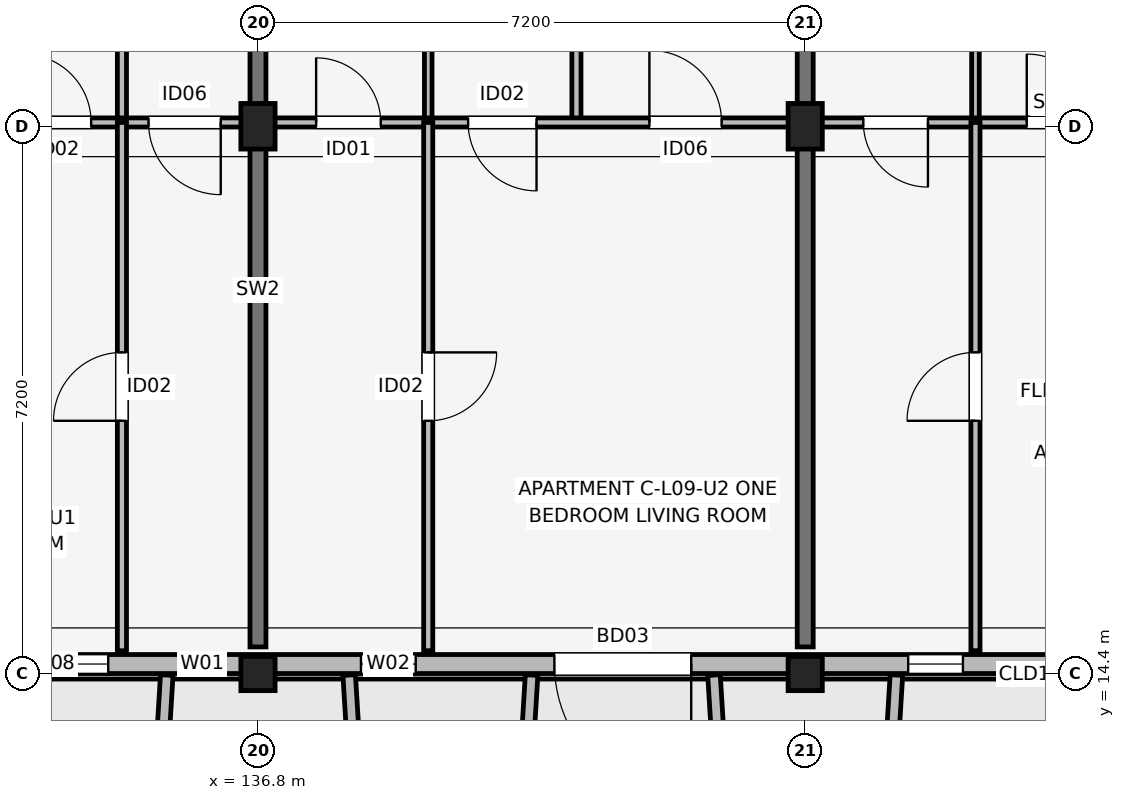
"""IFC4 building model, lengths in metres.
Left out: names, types, materials, properties, quantities, classifications, styles, units other than length and angle.
Written with IfcOpenShell. Run it as: python <this file> out.ifc"""

import sys

from ifc_helpers import new_model, si_unit, direction, frame, frame_2d, origin, origin_2d, place, context, subcontext, project, spatial, rectangle, extrude, element, fill, save


model = new_model("IFC4")
c1 = context("Model", 3, precision=1e-05, world=origin(), true_north=direction((0.0, 1.0)))
c2 = subcontext(c1, "Body", "Model", "MODEL_VIEW")
j1 = project(units=[si_unit("LENGTHUNIT", "METRE"), si_unit("PLANEANGLEUNIT", "RADIAN")], contexts=[c1])
p1 = place(None, origin())
s1 = spatial("IfcSite", under=j1, at=p1, CompositionType="ELEMENT")
p2 = place(p1, origin())
s2 = spatial("IfcBuilding", under=s1, at=p2, CompositionType="ELEMENT")
p3 = place(p2, frame((0.0, 0.0, 30.75)))
s3 = spatial("IfcBuildingStorey", under=s2, at=p3, CompositionType="ELEMENT", Elevation=30.75)
p4 = place(p3, frame((136.8, 14.4, 0.0), z_axis=(0.0, 0.0, 1.0), x_axis=(1.0, 0.0, 0.0)))
e1 = element("IfcColumn", 1, at=p4, inside=s3, PredefinedType="COLUMN", context=c2, shape_type="SweptSolid", body=[
    extrude(rectangle(XDim=0.45, YDim=0.45, at=origin_2d()), origin(), (0.0, 0.0, 1.0), 3.15),
])
p5 = place(p3, frame((136.8, 21.6, 0.0), z_axis=(0.0, 0.0, 1.0), x_axis=(1.0, 0.0, 0.0)))
e2 = element("IfcColumn", 2, at=p5, inside=s3, PredefinedType="COLUMN", context=c2, shape_type="SweptSolid", body=[
    extrude(rectangle(XDim=0.45, YDim=0.6, at=origin_2d()), origin(), (0.0, 0.0, 1.0), 3.15),
])
p6 = place(p3, frame((144.0, 14.4, 0.0), z_axis=(0.0, 0.0, 1.0), x_axis=(1.0, 0.0, 0.0)))
e3 = element("IfcColumn", 3, at=p6, inside=s3, PredefinedType="COLUMN", context=c2, shape_type="SweptSolid", body=[
    extrude(rectangle(XDim=0.45, YDim=0.45, at=origin_2d()), origin(), (0.0, 0.0, 1.0), 3.15),
])
p7 = place(p3, frame((144.0, 21.6, 0.0), z_axis=(0.0, 0.0, 1.0), x_axis=(1.0, 0.0, 0.0)))
e4 = element("IfcColumn", 4, at=p7, inside=s3, PredefinedType="COLUMN", context=c2, shape_type="SweptSolid", body=[
    extrude(rectangle(XDim=0.45, YDim=0.6, at=origin_2d()), origin(), (0.0, 0.0, 1.0), 3.15),
])
for number, where, z_axis, x_axis in (
    (5, (136.8, 14.75, 0.0), (0.0, 0.0, 1.0), (0.0, 1.0, 0.0)),
    (6, (144.0, 14.75, 0.0), (0.0, 0.0, 1.0), (0.0, 1.0, 0.0)),
):
    element("IfcWall", number, at=place(p3, frame(where, z_axis=z_axis, x_axis=x_axis)), inside=s3, PredefinedType="SHEAR", context=c2, shape_type="SweptSolid", body=[
        extrude(rectangle(XDim=9.4, YDim=0.21, at=frame_2d((4.7, 0.0))), origin(), (0.0, 0.0, 1.0), 3.15),
    ])
p8 = place(p3, frame((132.6, 14.525, 0.0), z_axis=(0.0, 0.0, 1.0), x_axis=(1.0, 0.0, 0.0)))
e7 = element("IfcWall", 7, at=p8, inside=s3, PredefinedType="SOLIDWALL", context=c2, shape_type="SweptSolid", body=[
    extrude(rectangle(XDim=30.0, YDim=0.25, at=frame_2d((15.0, 0.0))), origin(), (0.0, 0.0, 1.0), 2.48),
])
p9 = place(p8, frame((9.9, 0.0, 0.0), z_axis=(0.0, 0.0, 1.0), x_axis=(-1.0, 0.0, 0.0)))
e8 = element("IfcOpeningElement", 8, at=p9, cuts=e7, PredefinedType="OPENING", context=c2, shape_type="SweptSolid", body=[
    extrude(rectangle(XDim=1.8, YDim=2.15, at=frame_2d((0.9, 1.075))), frame((0.0, 0.135, 0.0), z_axis=(0.0, -1.0, 0.0), x_axis=(1.0, 0.0, 0.0)), (0.0, 0.0, 1.0), 0.27),
])
p10 = place(p8, frame((24.225, 0.0, 0.0), z_axis=(0.0, 0.0, 1.0), x_axis=(-1.0, 0.0, 0.0)))
e9 = element("IfcOpeningElement", 9, at=p10, cuts=e7, PredefinedType="OPENING", context=c2, shape_type="SweptSolid", body=[
    extrude(rectangle(XDim=1.65, YDim=2.15, at=frame_2d((0.825, 1.075))), frame((0.0, 0.135, 0.0), z_axis=(0.0, -1.0, 0.0), x_axis=(1.0, 0.0, 0.0)), (0.0, 0.0, 1.0), 0.27),
])
p11 = place(p8, frame((0.77, 0.0, 0.7)))
e10 = element("IfcOpeningElement", 10, at=p11, cuts=e7, PredefinedType="OPENING", context=c2, shape_type="SweptSolid", body=[
    extrude(rectangle(XDim=1.46, YDim=1.55, at=frame_2d((0.73, 0.775))), frame((0.0, 0.135, 0.0), z_axis=(0.0, -1.0, 0.0), x_axis=(1.0, 0.0, 0.0)), (0.0, 0.0, 1.0), 0.27),
])
p12 = place(p8, frame((3.167, 0.0, 0.75)))
e11 = element("IfcOpeningElement", 11, at=p12, cuts=e7, PredefinedType="OPENING", context=c2, shape_type="SweptSolid", body=[
    extrude(rectangle(XDim=0.6, YDim=1.25, at=frame_2d((0.3, 0.625))), frame((0.0, 0.135, 0.0), z_axis=(0.0, -1.0, 0.0), x_axis=(1.0, 0.0, 0.0)), (0.0, 0.0, 1.0), 0.27),
])
p13 = place(p8, frame((5.555, 0.0, 0.75)))
e12 = element("IfcOpeningElement", 12, at=p13, cuts=e7, PredefinedType="OPENING", context=c2, shape_type="SweptSolid", body=[
    extrude(rectangle(XDim=0.72, YDim=1.35, at=frame_2d((0.36, 0.675))), frame((0.0, 0.135, 0.0), z_axis=(0.0, -1.0, 0.0), x_axis=(1.0, 0.0, 0.0)), (0.0, 0.0, 1.0), 0.27),
])
p14 = place(p8, frame((12.755, 0.0, 0.75)))
e13 = element("IfcOpeningElement", 13, at=p14, cuts=e7, PredefinedType="OPENING", context=c2, shape_type="SweptSolid", body=[
    extrude(rectangle(XDim=0.72, YDim=1.35, at=frame_2d((0.36, 0.675))), frame((0.0, 0.135, 0.0), z_axis=(0.0, -1.0, 0.0), x_axis=(1.0, 0.0, 0.0)), (0.0, 0.0, 1.0), 0.27),
])
p15 = place(p8, frame((15.34, 0.0, 0.7)))
e14 = element("IfcOpeningElement", 14, at=p15, cuts=e7, PredefinedType="OPENING", context=c2, shape_type="SweptSolid", body=[
    extrude(rectangle(XDim=1.72, YDim=1.6, at=frame_2d((0.86, 0.8))), frame((0.0, 0.135, 0.0), z_axis=(0.0, -1.0, 0.0), x_axis=(1.0, 0.0, 0.0)), (0.0, 0.0, 1.0), 0.27),
])
p16 = place(p8, frame((26.232, 0.0, 0.75)))
e15 = element("IfcOpeningElement", 15, at=p16, cuts=e7, PredefinedType="OPENING", context=c2, shape_type="SweptSolid", body=[
    extrude(rectangle(XDim=0.6, YDim=1.25, at=frame_2d((0.3, 0.625))), frame((0.0, 0.135, 0.0), z_axis=(0.0, -1.0, 0.0), x_axis=(1.0, 0.0, 0.0)), (0.0, 0.0, 1.0), 0.27),
])
p17 = place(p8, frame((28.27, 0.0, 0.75)))
e16 = element("IfcOpeningElement", 16, at=p17, cuts=e7, PredefinedType="OPENING", context=c2, shape_type="SweptSolid", body=[
    extrude(rectangle(XDim=0.72, YDim=1.35, at=frame_2d((0.36, 0.675))), frame((0.0, 0.135, 0.0), z_axis=(0.0, -1.0, 0.0), x_axis=(1.0, 0.0, 0.0)), (0.0, 0.0, 1.0), 0.27),
])
p18 = place(p3, frame((135.6, 14.38, 0.0), z_axis=(0.0, 0.0, 1.0), x_axis=(-0.061170732449, -0.998127317276, 0.0)))
e17 = element("IfcWall", 17, at=p18, inside=s3, PredefinedType="ELEMENTEDWALL", context=c2, shape_type="SweptSolid", body=[
    extrude(rectangle(XDim=1.964, YDim=0.165, at=frame_2d((0.982, 0.0))), origin(), (0.0, 0.0, 1.0), 2.95),
])
for number, where, z_axis, x_axis in (
    (18, (138.0, 14.38, 0.0), (0.0, 0.0, 1.0), (0.061, -0.998, 0.0)),
    (19, (140.4, 14.38, 0.0), (0.0, 0.0, 1.0), (-0.061, -0.998, 0.0)),
    (20, (142.8, 14.38, 0.0), (0.0, 0.0, 1.0), (0.061, -0.998, 0.0)),
):
    element("IfcWall", number, at=place(p3, frame(where, z_axis=z_axis, x_axis=x_axis)), inside=s3, PredefinedType="ELEMENTEDWALL", context=c2, shape_type="SweptSolid", body=[
        extrude(rectangle(XDim=1.964, YDim=0.165, at=frame_2d((0.982, 0.0))), origin(), (0.0, 0.0, 1.0), 2.48),
    ])
p19 = place(p3, frame((145.2, 14.38, 0.0), z_axis=(0.0, 0.0, 1.0), x_axis=(-0.061046865508, -0.998134900808, 0.0)))
e21 = element("IfcWall", 21, at=p19, inside=s3, PredefinedType="ELEMENTEDWALL", context=c2, shape_type="SweptSolid", body=[
    extrude(rectangle(XDim=1.964, YDim=0.165, at=frame_2d((0.982, 0.0))), origin(), (0.0, 0.0, 1.0), 2.55),
])
p20 = place(p3, frame((135.01, 21.65, 0.0), z_axis=(0.0, 0.0, 1.0), x_axis=(0.0, 1.0, 0.0)))
e22 = element("IfcWall", 22, at=p20, inside=s3, PredefinedType="PARTITIONING", context=c2, shape_type="SweptSolid", body=[
    extrude(rectangle(XDim=2.65, YDim=0.12, at=frame_2d((1.325, 0.0))), origin(), (0.0, 0.0, 1.0), 2.38),
])
p21 = place(p3, frame((129.74, 21.65, 0.0), z_axis=(0.0, 0.0, 1.0), x_axis=(1.0, 0.0, 0.0)))
e23 = element("IfcWall", 23, at=p21, inside=s3, PredefinedType="PARTITIONING", context=c2, shape_type="SweptSolid", body=[
    extrude(rectangle(XDim=6.92, YDim=0.12, at=frame_2d((3.46, 0.0))), origin(), (0.0, 0.0, 1.0), 2.38),
])
p22 = place(p21, frame((3.06, 0.0, 0.0), z_axis=(0.0, 0.0, 1.0), x_axis=(-1.0, 0.0, 0.0)))
e24 = element("IfcOpeningElement", 24, at=p22, cuts=e23, PredefinedType="OPENING", context=c2, shape_type="SweptSolid", body=[
    extrude(rectangle(XDim=0.85, YDim=2.08, at=frame_2d((0.425, 1.04))), frame((0.0, 0.07, 0.0), z_axis=(0.0, -1.0, 0.0), x_axis=(1.0, 0.0, 0.0)), (0.0, 0.0, 1.0), 0.14),
])
p23 = place(p21, frame((3.965, 0.0, 0.0)))
e25 = element("IfcOpeningElement", 25, at=p23, cuts=e23, PredefinedType="OPENING", context=c2, shape_type="SweptSolid", body=[
    extrude(rectangle(XDim=0.9, YDim=2.08, at=frame_2d((0.45, 1.04))), frame((0.0, 0.07, 0.0), z_axis=(0.0, -1.0, 0.0), x_axis=(1.0, 0.0, 0.0)), (0.0, 0.0, 1.0), 0.14),
])
p24 = place(p21, frame((6.57, 0.0, 0.0), z_axis=(0.0, 0.0, 1.0), x_axis=(-1.0, 0.0, 0.0)))
e26 = element("IfcOpeningElement", 26, at=p24, cuts=e23, PredefinedType="OPENING", context=c2, shape_type="SweptSolid", body=[
    extrude(rectangle(XDim=0.95, YDim=2.08, at=frame_2d((0.475, 1.04))), frame((0.0, 0.07, 0.0), z_axis=(0.0, -1.0, 0.0), x_axis=(1.0, 0.0, 0.0)), (0.0, 0.0, 1.0), 0.14),
])
p25 = place(p3, frame((135.01, 14.7, 0.0), z_axis=(0.0, 0.0, 1.0), x_axis=(0.0, 1.0, 0.0)))
e27 = element("IfcWall", 27, at=p25, inside=s3, PredefinedType="PARTITIONING", context=c2, shape_type="SweptSolid", body=[
    extrude(rectangle(XDim=6.95, YDim=0.12, at=frame_2d((3.475, 0.0))), origin(), (0.0, 0.0, 1.0), 2.38),
])
p26 = place(p25, frame((3.025, 0.0, 0.0)))
e28 = element("IfcOpeningElement", 28, at=p26, cuts=e27, PredefinedType="OPENING", context=c2, shape_type="SweptSolid", body=[
    extrude(rectangle(XDim=0.9, YDim=2.08, at=frame_2d((0.45, 1.04))), frame((0.0, 0.07, 0.0), z_axis=(0.0, -1.0, 0.0), x_axis=(1.0, 0.0, 0.0)), (0.0, 0.0, 1.0), 0.14),
])
p27 = place(p3, frame((139.04, 21.65, 0.0), z_axis=(0.0, 0.0, 1.0), x_axis=(0.0, 1.0, 0.0)))
e29 = element("IfcWall", 29, at=p27, inside=s3, PredefinedType="PARTITIONING", context=c2, shape_type="SweptSolid", body=[
    extrude(rectangle(XDim=2.65, YDim=0.1, at=frame_2d((1.325, 0.0))), origin(), (0.0, 0.0, 1.0), 2.38),
])
p28 = place(p3, frame((140.99, 21.65, 0.0), z_axis=(0.0, 0.0, 1.0), x_axis=(0.0, 1.0, 0.0)))
e30 = element("IfcWall", 30, at=p28, inside=s3, PredefinedType="PARTITIONING", context=c2, shape_type="SweptSolid", body=[
    extrude(rectangle(XDim=2.65, YDim=0.12, at=frame_2d((1.325, 0.0))), origin(), (0.0, 0.0, 1.0), 2.38),
])
p29 = place(p3, frame((136.94, 21.65, 0.0), z_axis=(0.0, 0.0, 1.0), x_axis=(1.0, 0.0, 0.0)))
e31 = element("IfcWall", 31, at=p29, inside=s3, PredefinedType="PARTITIONING", context=c2, shape_type="SweptSolid", body=[
    extrude(rectangle(XDim=6.92, YDim=0.12, at=frame_2d((3.46, 0.0))), origin(), (0.0, 0.0, 1.0), 2.38),
])
p30 = place(p29, frame((0.625, 0.0, 0.0)))
e32 = element("IfcOpeningElement", 32, at=p30, cuts=e31, PredefinedType="OPENING", context=c2, shape_type="SweptSolid", body=[
    extrude(rectangle(XDim=0.85, YDim=2.08, at=frame_2d((0.425, 1.04))), frame((0.0, 0.07, 0.0), z_axis=(0.0, -1.0, 0.0), x_axis=(1.0, 0.0, 0.0)), (0.0, 0.0, 1.0), 0.14),
])
p31 = place(p29, frame((3.525, 0.0, 0.0), z_axis=(0.0, 0.0, 1.0), x_axis=(-1.0, 0.0, 0.0)))
e33 = element("IfcOpeningElement", 33, at=p31, cuts=e31, PredefinedType="OPENING", context=c2, shape_type="SweptSolid", body=[
    extrude(rectangle(XDim=0.9, YDim=2.08, at=frame_2d((0.45, 1.04))), frame((0.0, 0.07, 0.0), z_axis=(0.0, -1.0, 0.0), x_axis=(1.0, 0.0, 0.0)), (0.0, 0.0, 1.0), 0.14),
])
p32 = place(p29, frame((5.01, 0.0, 0.0)))
e34 = element("IfcOpeningElement", 34, at=p32, cuts=e31, PredefinedType="OPENING", context=c2, shape_type="SweptSolid", body=[
    extrude(rectangle(XDim=0.95, YDim=2.08, at=frame_2d((0.475, 1.04))), frame((0.0, 0.07, 0.0), z_axis=(0.0, -1.0, 0.0), x_axis=(1.0, 0.0, 0.0)), (0.0, 0.0, 1.0), 0.14),
])
p33 = place(p3, frame((139.04, 14.7, 0.0), z_axis=(0.0, 0.0, 1.0), x_axis=(0.0, 1.0, 0.0)))
e35 = element("IfcWall", 35, at=p33, inside=s3, PredefinedType="PARTITIONING", context=c2, shape_type="SweptSolid", body=[
    extrude(rectangle(XDim=6.95, YDim=0.12, at=frame_2d((3.475, 0.0))), origin(), (0.0, 0.0, 1.0), 2.38),
])
p34 = place(p33, frame((3.925, 0.0, 0.0), z_axis=(0.0, 0.0, 1.0), x_axis=(-1.0, 0.0, 0.0)))
e36 = element("IfcOpeningElement", 36, at=p34, cuts=e35, PredefinedType="OPENING", context=c2, shape_type="SweptSolid", body=[
    extrude(rectangle(XDim=0.9, YDim=2.08, at=frame_2d((0.45, 1.04))), frame((0.0, 0.07, 0.0), z_axis=(0.0, -1.0, 0.0), x_axis=(1.0, 0.0, 0.0)), (0.0, 0.0, 1.0), 0.14),
])
p35 = place(p3, frame((146.24, 21.65, 0.0), z_axis=(0.0, 0.0, 1.0), x_axis=(0.0, 1.0, 0.0)))
e37 = element("IfcWall", 37, at=p35, inside=s3, PredefinedType="PARTITIONING", context=c2, shape_type="SweptSolid", body=[
    extrude(rectangle(XDim=2.65, YDim=0.1, at=frame_2d((1.325, 0.0))), origin(), (0.0, 0.0, 1.0), 2.38),
])
p36 = place(p3, frame((144.14, 21.65, 0.0), z_axis=(0.0, 0.0, 1.0), x_axis=(1.0, 0.0, 0.0)))
e38 = element("IfcWall", 38, at=p36, inside=s3, PredefinedType="PARTITIONING", context=c2, shape_type="SweptSolid", body=[
    extrude(rectangle(XDim=6.92, YDim=0.12, at=frame_2d((3.46, 0.0))), origin(), (0.0, 0.0, 1.0), 2.38),
])
p37 = place(p36, frame((1.475, 0.0, 0.0), z_axis=(0.0, 0.0, 1.0), x_axis=(-1.0, 0.0, 0.0)))
e39 = element("IfcOpeningElement", 39, at=p37, cuts=e38, PredefinedType="OPENING", context=c2, shape_type="SweptSolid", body=[
    extrude(rectangle(XDim=0.85, YDim=2.08, at=frame_2d((0.425, 1.04))), frame((0.0, 0.07, 0.0), z_axis=(0.0, -1.0, 0.0), x_axis=(1.0, 0.0, 0.0)), (0.0, 0.0, 1.0), 0.14),
])
p38 = place(p36, frame((2.775, 0.0, 0.0)))
e40 = element("IfcOpeningElement", 40, at=p38, cuts=e38, PredefinedType="OPENING", context=c2, shape_type="SweptSolid", body=[
    extrude(rectangle(XDim=0.9, YDim=2.08, at=frame_2d((0.45, 1.04))), frame((0.0, 0.07, 0.0), z_axis=(0.0, -1.0, 0.0), x_axis=(1.0, 0.0, 0.0)), (0.0, 0.0, 1.0), 0.14),
])
p39 = place(p36, frame((6.11, 0.0, 0.0), z_axis=(0.0, 0.0, 1.0), x_axis=(-1.0, 0.0, 0.0)))
e41 = element("IfcOpeningElement", 41, at=p39, cuts=e38, PredefinedType="OPENING", context=c2, shape_type="SweptSolid", body=[
    extrude(rectangle(XDim=0.95, YDim=2.08, at=frame_2d((0.475, 1.04))), frame((0.0, 0.07, 0.0), z_axis=(0.0, -1.0, 0.0), x_axis=(1.0, 0.0, 0.0)), (0.0, 0.0, 1.0), 0.14),
])
p40 = place(p3, frame((146.24, 14.7, 0.0), z_axis=(0.0, 0.0, 1.0), x_axis=(0.0, 1.0, 0.0)))
e42 = element("IfcWall", 42, at=p40, inside=s3, PredefinedType="PARTITIONING", context=c2, shape_type="SweptSolid", body=[
    extrude(rectangle(XDim=6.95, YDim=0.12, at=frame_2d((3.475, 0.0))), origin(), (0.0, 0.0, 1.0), 2.38),
])
p41 = place(p40, frame((3.025, 0.0, 0.0)))
e43 = element("IfcOpeningElement", 43, at=p41, cuts=e42, PredefinedType="OPENING", context=c2, shape_type="SweptSolid", body=[
    extrude(rectangle(XDim=0.9, YDim=2.08, at=frame_2d((0.45, 1.04))), frame((0.0, 0.07, 0.0), z_axis=(0.0, -1.0, 0.0), x_axis=(1.0, 0.0, 0.0)), (0.0, 0.0, 1.0), 0.14),
])
p42 = place(p9, origin())
e44 = element("IfcDoor", 44, at=p42, inside=s3, OperationType="SINGLE_SWING_RIGHT", PredefinedType="DOOR", context=c2, shape_type="SweptSolid", body=[
    extrude(rectangle(XDim=1.8, YDim=2.15, at=frame_2d((0.9, 1.075))), frame((0.0, 0.025, 0.0), z_axis=(0.0, -1.0, 0.0), x_axis=(1.0, 0.0, 0.0)), (0.0, 0.0, 1.0), 0.05),
])
fill(e8, e44)
p43 = place(p11, origin())
e45 = element("IfcWindow", 45, at=p43, inside=s3, PartitioningType="SINGLE_PANEL", PredefinedType="WINDOW", context=c2, shape_type="SweptSolid", body=[
    extrude(rectangle(XDim=1.46, YDim=1.55, at=frame_2d((0.73, 0.775))), frame((0.0, 0.03, 0.0), z_axis=(0.0, -1.0, 0.0), x_axis=(1.0, 0.0, 0.0)), (0.0, 0.0, 1.0), 0.06),
])
fill(e10, e45)
p44 = place(p12, origin())
e46 = element("IfcWindow", 46, at=p44, inside=s3, PartitioningType="SINGLE_PANEL", PredefinedType="WINDOW", context=c2, shape_type="SweptSolid", body=[
    extrude(rectangle(XDim=0.6, YDim=1.25, at=frame_2d((0.3, 0.625))), frame((0.0, 0.03, 0.0), z_axis=(0.0, -1.0, 0.0), x_axis=(1.0, 0.0, 0.0)), (0.0, 0.0, 1.0), 0.06),
])
fill(e11, e46)
p45 = place(p13, origin())
e47 = element("IfcWindow", 47, at=p45, inside=s3, PartitioningType="SINGLE_PANEL", PredefinedType="WINDOW", context=c2, shape_type="SweptSolid", body=[
    extrude(rectangle(XDim=0.72, YDim=1.35, at=frame_2d((0.36, 0.675))), frame((0.0, 0.03, 0.0), z_axis=(0.0, -1.0, 0.0), x_axis=(1.0, 0.0, 0.0)), (0.0, 0.0, 1.0), 0.06),
])
fill(e12, e47)
p46 = place(p14, origin())
e48 = element("IfcWindow", 48, at=p46, inside=s3, PartitioningType="SINGLE_PANEL", PredefinedType="WINDOW", context=c2, shape_type="SweptSolid", body=[
    extrude(rectangle(XDim=0.72, YDim=1.35, at=frame_2d((0.36, 0.675))), frame((0.0, 0.03, 0.0), z_axis=(0.0, -1.0, 0.0), x_axis=(1.0, 0.0, 0.0)), (0.0, 0.0, 1.0), 0.06),
])
fill(e13, e48)
p47 = place(p23, origin())
e49 = element("IfcDoor", 49, at=p47, inside=s3, OperationType="SINGLE_SWING_LEFT", PredefinedType="DOOR", context=c2, shape_type="SweptSolid", body=[
    extrude(rectangle(XDim=0.9, YDim=2.08, at=frame_2d((0.45, 1.04))), frame((0.0, 0.025, 0.0), z_axis=(0.0, -1.0, 0.0), x_axis=(1.0, 0.0, 0.0)), (0.0, 0.0, 1.0), 0.05),
])
fill(e25, e49)
p48 = place(p24, origin())
e50 = element("IfcDoor", 50, at=p48, inside=s3, OperationType="SINGLE_SWING_RIGHT", PredefinedType="DOOR", context=c2, shape_type="SweptSolid", body=[
    extrude(rectangle(XDim=0.95, YDim=2.08, at=frame_2d((0.475, 1.04))), frame((0.0, 0.025, 0.0), z_axis=(0.0, -1.0, 0.0), x_axis=(1.0, 0.0, 0.0)), (0.0, 0.0, 1.0), 0.05),
])
fill(e26, e50)
p49 = place(p26, origin())
e51 = element("IfcDoor", 51, at=p49, inside=s3, OperationType="SINGLE_SWING_LEFT", PredefinedType="DOOR", context=c2, shape_type="SweptSolid", body=[
    extrude(rectangle(XDim=0.9, YDim=2.08, at=frame_2d((0.45, 1.04))), frame((0.0, 0.025, 0.0), z_axis=(0.0, -1.0, 0.0), x_axis=(1.0, 0.0, 0.0)), (0.0, 0.0, 1.0), 0.05),
])
fill(e28, e51)
p50 = place(p30, origin())
e52 = element("IfcDoor", 52, at=p50, inside=s3, OperationType="SINGLE_SWING_LEFT", PredefinedType="DOOR", context=c2, shape_type="SweptSolid", body=[
    extrude(rectangle(XDim=0.85, YDim=2.08, at=frame_2d((0.425, 1.04))), frame((0.0, 0.025, 0.0), z_axis=(0.0, -1.0, 0.0), x_axis=(1.0, 0.0, 0.0)), (0.0, 0.0, 1.0), 0.05),
])
fill(e32, e52)
p51 = place(p31, origin())
e53 = element("IfcDoor", 53, at=p51, inside=s3, OperationType="SINGLE_SWING_RIGHT", PredefinedType="DOOR", context=c2, shape_type="SweptSolid", body=[
    extrude(rectangle(XDim=0.9, YDim=2.08, at=frame_2d((0.45, 1.04))), frame((0.0, 0.025, 0.0), z_axis=(0.0, -1.0, 0.0), x_axis=(1.0, 0.0, 0.0)), (0.0, 0.0, 1.0), 0.05),
])
fill(e33, e53)
p52 = place(p32, origin())
e54 = element("IfcDoor", 54, at=p52, inside=s3, OperationType="SINGLE_SWING_LEFT", PredefinedType="DOOR", context=c2, shape_type="SweptSolid", body=[
    extrude(rectangle(XDim=0.95, YDim=2.08, at=frame_2d((0.475, 1.04))), frame((0.0, 0.025, 0.0), z_axis=(0.0, -1.0, 0.0), x_axis=(1.0, 0.0, 0.0)), (0.0, 0.0, 1.0), 0.05),
])
fill(e34, e54)
p53 = place(p34, origin())
e55 = element("IfcDoor", 55, at=p53, inside=s3, OperationType="SINGLE_SWING_RIGHT", PredefinedType="DOOR", context=c2, shape_type="SweptSolid", body=[
    extrude(rectangle(XDim=0.9, YDim=2.08, at=frame_2d((0.45, 1.04))), frame((0.0, 0.025, 0.0), z_axis=(0.0, -1.0, 0.0), x_axis=(1.0, 0.0, 0.0)), (0.0, 0.0, 1.0), 0.05),
])
fill(e36, e55)
p54 = place(p37, origin())
e56 = element("IfcDoor", 56, at=p54, inside=s3, OperationType="SINGLE_SWING_RIGHT", PredefinedType="DOOR", context=c2, shape_type="SweptSolid", body=[
    extrude(rectangle(XDim=0.85, YDim=2.08, at=frame_2d((0.425, 1.04))), frame((0.0, 0.025, 0.0), z_axis=(0.0, -1.0, 0.0), x_axis=(1.0, 0.0, 0.0)), (0.0, 0.0, 1.0), 0.05),
])
fill(e39, e56)
p55 = place(p38, origin())
e57 = element("IfcDoor", 57, at=p55, inside=s3, OperationType="SINGLE_SWING_LEFT", PredefinedType="DOOR", context=c2, shape_type="SweptSolid", body=[
    extrude(rectangle(XDim=0.9, YDim=2.08, at=frame_2d((0.45, 1.04))), frame((0.0, 0.025, 0.0), z_axis=(0.0, -1.0, 0.0), x_axis=(1.0, 0.0, 0.0)), (0.0, 0.0, 1.0), 0.05),
])
fill(e40, e57)
p56 = place(p41, origin())
e58 = element("IfcDoor", 58, at=p56, inside=s3, OperationType="SINGLE_SWING_LEFT", PredefinedType="DOOR", context=c2, shape_type="SweptSolid", body=[
    extrude(rectangle(XDim=0.9, YDim=2.08, at=frame_2d((0.45, 1.04))), frame((0.0, 0.025, 0.0), z_axis=(0.0, -1.0, 0.0), x_axis=(1.0, 0.0, 0.0)), (0.0, 0.0, 1.0), 0.05),
])
fill(e43, e58)
save(model, sys.argv[1])
